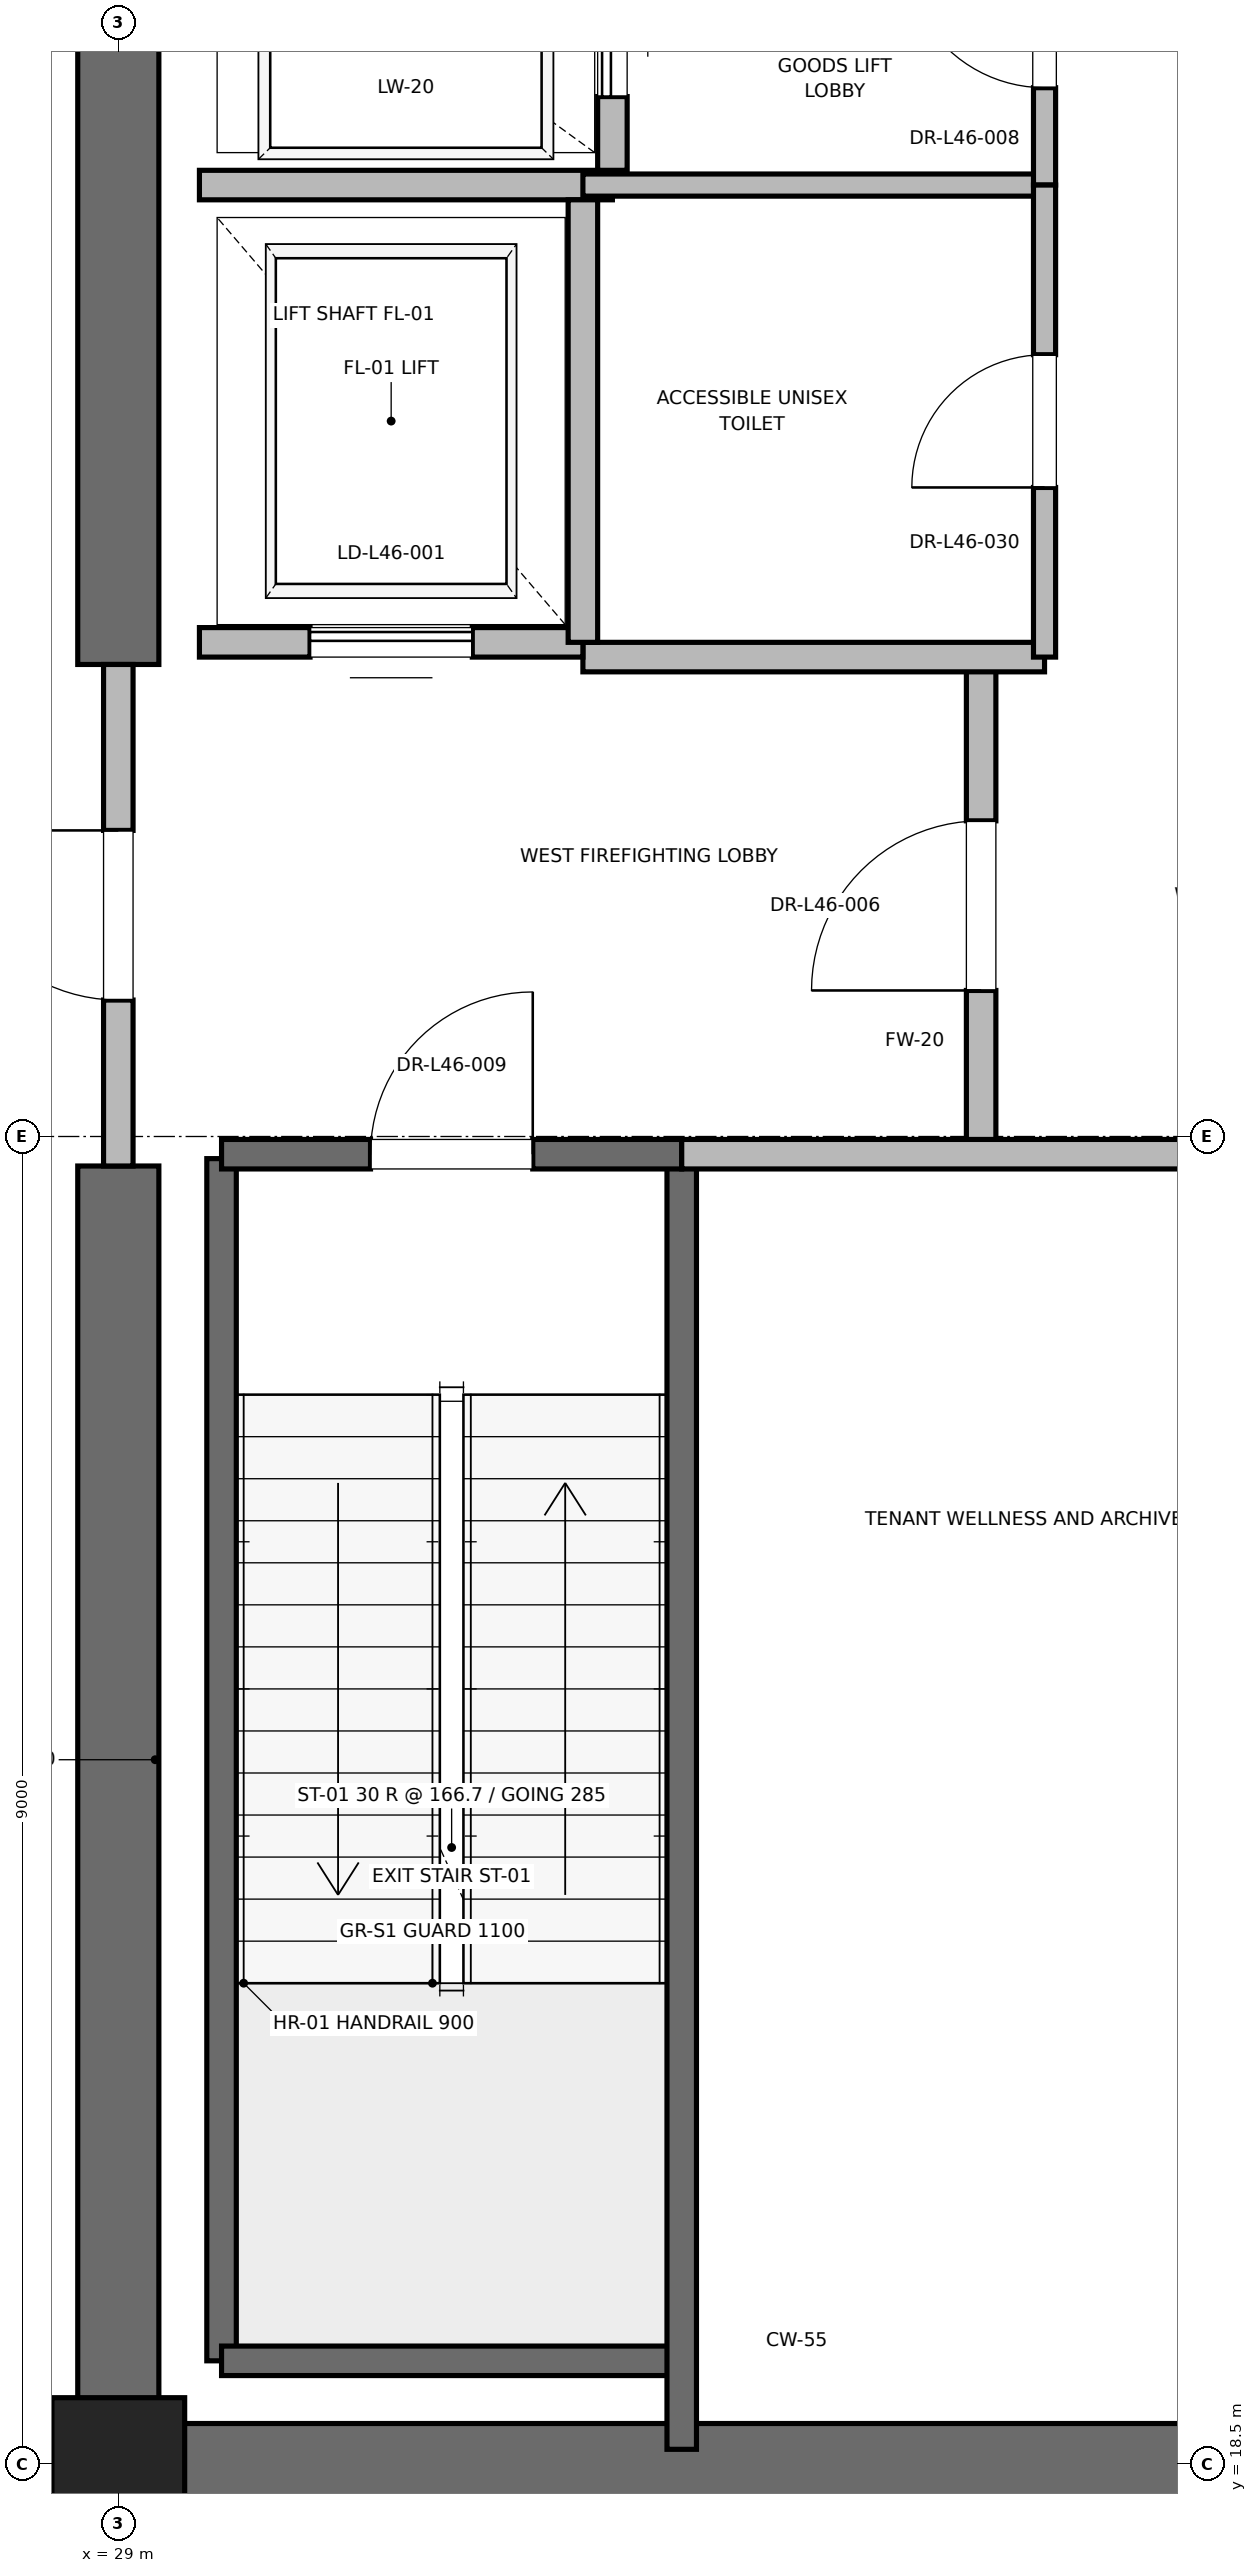
"""IFC4 building model, lengths in metres.
Left out: names, types, materials, properties, quantities, classifications, styles, units other than length and angle.
Written with IfcOpenShell. Run it as: python <this file> out.ifc"""

import sys

from ifc_helpers import new_model, si_unit, direction, frame, frame_2d, origin, origin_2d, place, context, subcontext, project, spatial, rectangle, extrude, element, fill, save


model = new_model("IFC4")
c1 = context("Model", 3, precision=1e-05, world=origin(), true_north=direction((0.0, 1.0)))
c2 = subcontext(c1, "Body", "Model", "MODEL_VIEW")
j1 = project(units=[si_unit("LENGTHUNIT", "METRE"), si_unit("PLANEANGLEUNIT", "RADIAN")], contexts=[c1])
p1 = place(None, origin())
s1 = spatial("IfcSite", under=j1, at=p1, CompositionType="ELEMENT")
p2 = place(p1, origin())
s2 = spatial("IfcBuilding", under=s1, at=p2, CompositionType="ELEMENT")
p3 = place(p2, frame((0.0, 0.0, 200.2)))
s3 = spatial("IfcBuildingStorey", under=s2, at=p3, CompositionType="ELEMENT", Elevation=200.2)
p4 = place(p3, frame((29.0, 18.5, 0.0), z_axis=(0.0, 0.0, 1.0), x_axis=(1.0, 0.0, 0.0)))
e1 = element("IfcColumn", 1, at=p4, inside=s3, PredefinedType="PILASTER", context=c2, shape_type="SweptSolid", body=[
    extrude(rectangle(XDim=0.9, YDim=0.9, at=origin_2d()), origin(), (0.0, 0.0, 1.0), 5.0),
])
p5 = place(p3, frame((29.0, 18.5, 0.0), z_axis=(0.0, 0.0, 1.0), x_axis=(1.0, 0.0, 0.0)))
e2 = element("IfcWall", 2, at=p5, inside=s3, PredefinedType="SHEAR", context=c2, shape_type="SweptSolid", body=[
    extrude(rectangle(XDim=9.2, YDim=0.55, at=frame_2d((4.6, 0.0))), origin(), (0.0, 0.0, 1.0), 4.775),
])
p6 = place(p3, frame((29.0, 18.5, 0.0), z_axis=(0.0, 0.0, 1.0), x_axis=(0.0, 1.0, 0.0)))
e3 = element("IfcWall", 3, at=p6, inside=s3, PredefinedType="SHEAR", context=c2, shape_type="SweptSolid", body=[
    extrude(rectangle(XDim=8.8, YDim=0.55, at=frame_2d((4.4, 0.0))), origin(), (0.0, 0.0, 1.0), 4.775),
])
p7 = place(p3, frame((29.0, 30.7, 0.0), z_axis=(0.0, 0.0, 1.0), x_axis=(0.0, 1.0, 0.0)))
e4 = element("IfcWall", 4, at=p7, inside=s3, PredefinedType="SHEAR", context=c2, shape_type="SweptSolid", body=[
    extrude(rectangle(XDim=5.8, YDim=0.55, at=frame_2d((2.9, 0.0))), origin(), (0.0, 0.0, 1.0), 4.775),
])
p8 = place(p3, frame((29.7, 19.2, 0.0), z_axis=(0.0, 0.0, 1.0), x_axis=(0.0, 1.0, 0.0)))
e5 = element("IfcWall", 5, at=p8, inside=s3, PredefinedType="SOLIDWALL", context=c2, shape_type="SweptSolid", body=[
    extrude(rectangle(XDim=8.15, YDim=0.2, at=frame_2d((4.075, 0.0))), origin(), (0.0, 0.0, 1.0), 4.775),
])
p9 = place(p3, frame((29.7, 19.2, 0.0), z_axis=(0.0, 0.0, 1.0), x_axis=(1.0, 0.0, 0.0)))
e6 = element("IfcWall", 6, at=p9, inside=s3, PredefinedType="SOLIDWALL", context=c2, shape_type="SweptSolid", body=[
    extrude(rectangle(XDim=3.12, YDim=0.2, at=frame_2d((1.56, 0.0))), origin(), (0.0, 0.0, 1.0), 4.775),
])
p10 = place(p3, frame((32.82, 18.6, 0.0), z_axis=(0.0, 0.0, 1.0), x_axis=(0.0, 1.0, 0.0)))
e7 = element("IfcWall", 7, at=p10, inside=s3, PredefinedType="SOLIDWALL", context=c2, shape_type="SweptSolid", body=[
    extrude(rectangle(XDim=8.78, YDim=0.2, at=frame_2d((4.39, 0.0))), origin(), (0.0, 0.0, 1.0), 4.775),
])
p11 = place(p3, frame((29.7, 27.38, 0.0), z_axis=(0.0, 0.0, 1.0), x_axis=(1.0, 0.0, 0.0)))
e8 = element("IfcWall", 8, at=p11, inside=s3, PredefinedType="SOLIDWALL", context=c2, shape_type="SweptSolid", body=[
    extrude(rectangle(XDim=3.12, YDim=0.2, at=frame_2d((1.56, 0.0))), origin(), (0.0, 0.0, 1.0), 4.775),
])
p12 = place(p11, frame((1.01, 0.0, 0.0)))
e9 = element("IfcOpeningElement", 9, at=p12, cuts=e8, PredefinedType="OPENING", context=c2, shape_type="SweptSolid", body=[
    extrude(rectangle(XDim=1.1, YDim=2.15, at=frame_2d((0.55, 1.075))), frame((0.0, 0.1, 0.0), z_axis=(0.0, -1.0, 0.0), x_axis=(1.0, 0.0, 0.0)), (0.0, 0.0, 1.0), 0.2),
])
p13 = place(p3, frame((34.85, 27.38, 0.0), z_axis=(0.0, 0.0, 1.0), x_axis=(0.0, 1.0, 0.0)))
e10 = element("IfcWall", 10, at=p13, inside=s3, PredefinedType="PARTITIONING", context=c2, shape_type="SweptSolid", body=[
    extrude(rectangle(XDim=3.37, YDim=0.2, at=frame_2d((1.685, 0.0))), origin(), (0.0, 0.0, 1.0), 4.775),
])
p14 = place(p13, frame((1.11, 0.0, 0.0)))
e11 = element("IfcOpeningElement", 11, at=p14, cuts=e10, PredefinedType="OPENING", context=c2, shape_type="SweptSolid", body=[
    extrude(rectangle(XDim=1.15, YDim=2.2, at=frame_2d((0.575, 1.1))), frame((0.0, 0.1, 0.0), z_axis=(0.0, -1.0, 0.0), x_axis=(1.0, 0.0, 0.0)), (0.0, 0.0, 1.0), 0.2),
])
p15 = place(p3, frame((29.0, 27.3, 0.0), z_axis=(0.0, 0.0, 1.0), x_axis=(0.0, 1.0, 0.0)))
e12 = element("IfcWall", 12, at=p15, inside=s3, PredefinedType="PARTITIONING", context=c2, shape_type="SweptSolid", body=[
    extrude(rectangle(XDim=3.4, YDim=0.2, at=frame_2d((1.7, 0.0))), origin(), (0.0, 0.0, 1.0), 3.755),
])
p16 = place(p15, frame((1.125, 0.0, 0.0)))
e13 = element("IfcOpeningElement", 13, at=p16, cuts=e12, PredefinedType="OPENING", context=c2, shape_type="SweptSolid", body=[
    extrude(rectangle(XDim=1.15, YDim=2.2, at=frame_2d((0.575, 1.1))), frame((0.0, 0.1, 0.0), z_axis=(0.0, -1.0, 0.0), x_axis=(1.0, 0.0, 0.0)), (0.0, 0.0, 1.0), 0.2),
])
p17 = place(p3, frame((32.82, 27.38, 0.0), z_axis=(0.0, 0.0, 1.0), x_axis=(1.0, 0.0, 0.0)))
e14 = element("IfcWall", 14, at=p17, inside=s3, PredefinedType="PARTITIONING", context=c2, shape_type="SweptSolid", body=[
    extrude(rectangle(XDim=5.62, YDim=0.2, at=frame_2d((2.81, 0.0))), origin(), (0.0, 0.0, 1.0), 4.775),
])
p18 = place(p3, frame((32.15, 30.75, 0.0), z_axis=(0.0, 0.0, 1.0), x_axis=(1.0, 0.0, 0.0)))
e15 = element("IfcWall", 15, at=p18, inside=s3, PredefinedType="PARTITIONING", context=c2, shape_type="SweptSolid", body=[
    extrude(rectangle(XDim=3.13, YDim=0.2, at=frame_2d((1.565, 0.0))), origin(), (0.0, 0.0, 1.0), 4.775),
])
p19 = place(p3, frame((29.55, 30.85, 0.0), z_axis=(0.0, 0.0, 1.0), x_axis=(1.0, 0.0, 0.0)))
e16 = element("IfcWall", 16, at=p19, inside=s3, PredefinedType="SOLIDWALL", context=c2, shape_type="SweptSolid", body=[
    extrude(rectangle(XDim=2.6, YDim=0.2, at=frame_2d((1.3, 0.0))), origin(), (0.0, 0.0, 1.0), 3.755),
])
p20 = place(p19, frame((0.75, 0.0, 0.0)))
e17 = element("IfcOpeningElement", 17, at=p20, cuts=e16, PredefinedType="OPENING", context=c2, shape_type="SweptSolid", body=[
    extrude(rectangle(XDim=1.1, YDim=2.2, at=frame_2d((0.55, 1.1))), frame((0.0, 0.1, 0.0), z_axis=(0.0, -1.0, 0.0), x_axis=(1.0, 0.0, 0.0)), (0.0, 0.0, 1.0), 0.2),
])
p21 = place(p3, frame((29.55, 33.95, 0.0), z_axis=(0.0, 0.0, 1.0), x_axis=(1.0, 0.0, 0.0)))
e18 = element("IfcWall", 18, at=p21, inside=s3, PredefinedType="SOLIDWALL", context=c2, shape_type="SweptSolid", body=[
    extrude(rectangle(XDim=2.8, YDim=0.2, at=frame_2d((1.4, 0.0))), origin(), (0.0, 0.0, 1.0), 4.775),
])
p22 = place(p3, frame((32.15, 30.85, 0.0), z_axis=(0.0, 0.0, 1.0), x_axis=(0.0, 1.0, 0.0)))
e19 = element("IfcWall", 19, at=p22, inside=s3, PredefinedType="SOLIDWALL", context=c2, shape_type="SweptSolid", body=[
    extrude(rectangle(XDim=3.0, YDim=0.2, at=frame_2d((1.5, 0.0))), origin(), (0.0, 0.0, 1.0), 4.775),
])
p23 = place(p3, frame((32.35, 34.05, 0.0), z_axis=(0.0, 0.0, 1.0), x_axis=(0.0, 1.0, 0.0)))
e20 = element("IfcWall", 20, at=p23, inside=s3, PredefinedType="SOLIDWALL", context=c2, shape_type="SweptSolid", body=[
    extrude(rectangle(XDim=2.1, YDim=0.2, at=frame_2d((1.05, 0.0))), origin(), (0.0, 0.0, 1.0), 4.775),
])
p24 = place(p23, frame((0.5, 0.0, 0.0)))
e21 = element("IfcOpeningElement", 21, at=p24, cuts=e20, PredefinedType="OPENING", context=c2, shape_type="SweptSolid", body=[
    extrude(rectangle(XDim=1.1, YDim=2.2, at=frame_2d((0.55, 1.1))), frame((0.0, 0.1, 0.0), z_axis=(0.0, -1.0, 0.0), x_axis=(1.0, 0.0, 0.0)), (0.0, 0.0, 1.0), 0.2),
])
p25 = place(p3, frame((32.15, 33.95, 0.0), z_axis=(0.0, 0.0, 1.0), x_axis=(1.0, 0.0, 0.0)))
e22 = element("IfcWall", 22, at=p25, inside=s3, PredefinedType="PARTITIONING", context=c2, shape_type="SweptSolid", body=[
    extrude(rectangle(XDim=3.13, YDim=0.15, at=frame_2d((1.565, 0.0))), origin(), (0.0, 0.0, 1.0), 2.85),
])
p26 = place(p3, frame((35.28, 33.95, 0.0), z_axis=(0.0, 0.0, 1.0), x_axis=(0.0, 1.0, 0.0)))
e23 = element("IfcWall", 23, at=p26, inside=s3, PredefinedType="PARTITIONING", context=c2, shape_type="SweptSolid", body=[
    extrude(rectangle(XDim=2.27, YDim=0.15, at=frame_2d((1.135, 0.0))), origin(), (0.0, 0.0, 1.0), 2.85),
])
p27 = place(p26, frame((0.66, 0.0, 0.0)))
e24 = element("IfcOpeningElement", 24, at=p27, cuts=e23, PredefinedType="OPENING", context=c2, shape_type="SweptSolid", body=[
    extrude(rectangle(XDim=0.95, YDim=2.15, at=frame_2d((0.475, 1.075))), frame((0.0, 0.075, 0.0), z_axis=(0.0, -1.0, 0.0), x_axis=(1.0, 0.0, 0.0)), (0.0, 0.0, 1.0), 0.15),
])
p28 = place(p3, frame((35.28, 30.75, 0.0), z_axis=(0.0, 0.0, 1.0), x_axis=(0.0, 1.0, 0.0)))
e25 = element("IfcWall", 25, at=p28, inside=s3, PredefinedType="PARTITIONING", context=c2, shape_type="SweptSolid", body=[
    extrude(rectangle(XDim=3.2, YDim=0.15, at=frame_2d((1.6, 0.0))), origin(), (0.0, 0.0, 1.0), 2.85),
])
p29 = place(p28, frame((1.15, 0.0, 0.0)))
e26 = element("IfcOpeningElement", 26, at=p29, cuts=e25, PredefinedType="OPENING", context=c2, shape_type="SweptSolid", body=[
    extrude(rectangle(XDim=0.9, YDim=2.1, at=frame_2d((0.45, 1.05))), frame((0.0, 0.075, 0.0), z_axis=(0.0, -1.0, 0.0), x_axis=(1.0, 0.0, 0.0)), (0.0, 0.0, 1.0), 0.15),
])
p30 = place(p12, origin())
e27 = element("IfcDoor", 27, at=p30, inside=s3, OperationType="SINGLE_SWING_RIGHT", PredefinedType="DOOR", context=c2, shape_type="SweptSolid", body=[
    extrude(rectangle(XDim=1.1, YDim=2.15, at=frame_2d((0.55, 1.075))), frame((0.0, 0.025, 0.0), z_axis=(0.0, -1.0, 0.0), x_axis=(1.0, 0.0, 0.0)), (0.0, 0.0, 1.0), 0.05),
])
fill(e9, e27)
p31 = place(p14, origin())
e28 = element("IfcDoor", 28, at=p31, inside=s3, OperationType="SINGLE_SWING_LEFT", PredefinedType="DOOR", context=c2, shape_type="SweptSolid", body=[
    extrude(rectangle(XDim=1.15, YDim=2.2, at=frame_2d((0.575, 1.1))), frame((0.0, 0.025, 0.0), z_axis=(0.0, -1.0, 0.0), x_axis=(1.0, 0.0, 0.0)), (0.0, 0.0, 1.0), 0.05),
])
fill(e11, e28)
p32 = place(p16, origin())
e29 = element("IfcDoor", 29, at=p32, inside=s3, OperationType="SINGLE_SWING_RIGHT", PredefinedType="DOOR", context=c2, shape_type="SweptSolid", body=[
    extrude(rectangle(XDim=1.15, YDim=2.2, at=frame_2d((0.575, 1.1))), frame((0.0, 0.025, 0.0), z_axis=(0.0, -1.0, 0.0), x_axis=(1.0, 0.0, 0.0)), (0.0, 0.0, 1.0), 0.05),
])
fill(e13, e29)
p33 = place(p20, origin())
e30 = element("IfcDoor", 30, at=p33, inside=s3, OperationType="SLIDING_TO_RIGHT", PredefinedType="DOOR", context=c2, shape_type="SweptSolid", body=[
    extrude(rectangle(XDim=1.1, YDim=2.2, at=frame_2d((0.55, 1.1))), frame((0.0, 0.025, 0.0), z_axis=(0.0, -1.0, 0.0), x_axis=(1.0, 0.0, 0.0)), (0.0, 0.0, 1.0), 0.05),
])
fill(e17, e30)
p34 = place(p24, origin())
e31 = element("IfcDoor", 31, at=p34, inside=s3, OperationType="SLIDING_TO_RIGHT", PredefinedType="DOOR", context=c2, shape_type="SweptSolid", body=[
    extrude(rectangle(XDim=1.1, YDim=2.2, at=frame_2d((0.55, 1.1))), frame((0.0, 0.025, 0.0), z_axis=(0.0, -1.0, 0.0), x_axis=(1.0, 0.0, 0.0)), (0.0, 0.0, 1.0), 0.05),
])
fill(e21, e31)
p35 = place(p27, origin())
e32 = element("IfcDoor", 32, at=p35, inside=s3, OperationType="SINGLE_SWING_RIGHT", PredefinedType="DOOR", context=c2, shape_type="SweptSolid", body=[
    extrude(rectangle(XDim=0.95, YDim=2.15, at=frame_2d((0.475, 1.075))), frame((0.0, 0.025, 0.0), z_axis=(0.0, -1.0, 0.0), x_axis=(1.0, 0.0, 0.0)), (0.0, 0.0, 1.0), 0.05),
])
fill(e24, e32)
p36 = place(p29, origin())
e33 = element("IfcDoor", 33, at=p36, inside=s3, OperationType="SINGLE_SWING_LEFT", PredefinedType="DOOR", context=c2, shape_type="SweptSolid", body=[
    extrude(rectangle(XDim=0.9, YDim=2.1, at=frame_2d((0.45, 1.05))), frame((0.0, 0.025, 0.0), z_axis=(0.0, -1.0, 0.0), x_axis=(1.0, 0.0, 0.0)), (0.0, 0.0, 1.0), 0.05),
])
fill(e26, e33)
save(model, sys.argv[1])
